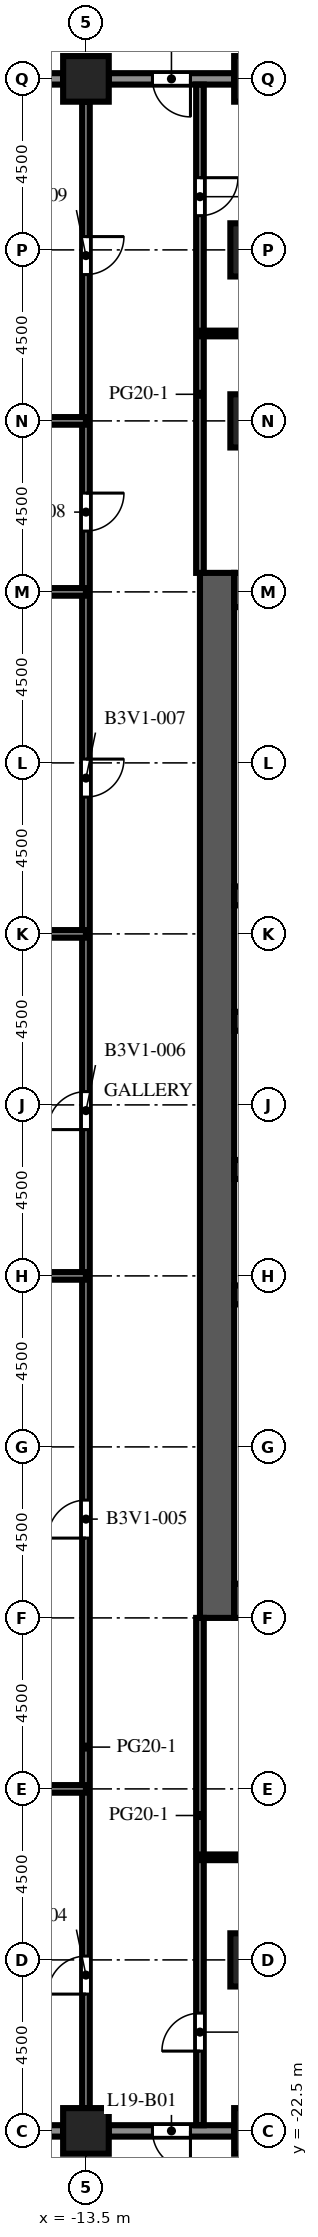
"""IFC4 building model, lengths in metres.
Left out: names, types, materials, properties, quantities, classifications, styles, units other than length and angle.
Written with IfcOpenShell. Run it as: python <this file> out.ifc"""

import sys

from ifc_helpers import new_model, si_unit, direction, frame, frame_2d, origin, origin_2d, place, context, subcontext, project, spatial, rectangle, extrude, element, fill, save


model = new_model("IFC4")
c1 = context("Model", 3, precision=1e-05, world=origin(), true_north=direction((0.0, 1.0)))
c2 = subcontext(c1, "Body", "Model", "MODEL_VIEW")
j1 = project(units=[si_unit("LENGTHUNIT", "METRE"), si_unit("PLANEANGLEUNIT", "RADIAN")], contexts=[c1])
p1 = place(None, origin())
s1 = spatial("IfcSite", under=j1, at=p1, CompositionType="ELEMENT")
p2 = place(p1, origin())
s2 = spatial("IfcBuilding", under=s1, at=p2, CompositionType="ELEMENT")
p3 = place(p2, frame((0.0, 0.0, 86.1)))
s3 = spatial("IfcBuildingStorey", under=s2, at=p3, CompositionType="ELEMENT", Elevation=86.1)
for number, where, z_axis, x_axis in (
    (1, (-13.5, -22.5, 0.0), (0.0, 0.0, 1.0), (1.0, 0.0, 0.0)),
    (2, (-13.5, 31.5, 0.0), (0.0, 0.0, 1.0), (1.0, 0.0, 0.0)),
    (3, (-9.0, -22.5, 0.0), (0.0, 0.0, 1.0), (1.0, 0.0, 0.0)),
    (4, (-9.0, 31.5, 0.0), (0.0, 0.0, 1.0), (1.0, 0.0, 0.0)),
):
    element("IfcColumn", number, at=place(p3, frame(where, z_axis=z_axis, x_axis=x_axis)), inside=s3, PredefinedType="COLUMN", context=c2, shape_type="SweptSolid", body=[
        extrude(rectangle(XDim=1.2, YDim=1.2, at=origin_2d()), origin(), (0.0, 0.0, 1.0), 4.1),
    ])
for number, where, z_axis, x_axis in (
    (5, (-9.0, -18.0, 0.0), (0.0, 0.0, 1.0), (1.0, 0.0, 0.0)),
    (6, (-9.0, 22.5, 0.0), (0.0, 0.0, 1.0), (1.0, 0.0, 0.0)),
    (7, (-9.0, 27.0, 0.0), (0.0, 0.0, 1.0), (1.0, 0.0, 0.0)),
):
    element("IfcColumn", number, at=place(p3, frame(where, z_axis=z_axis, x_axis=x_axis)), inside=s3, PredefinedType="COLUMN", context=c2, shape_type="SweptSolid", body=[
        extrude(rectangle(XDim=1.4, YDim=1.4, at=origin_2d()), origin(), (0.0, 0.0, 1.0), 4.1),
    ])
p4 = place(p3, frame((-10.05, -9.0, 0.0), z_axis=(0.0, 0.0, 1.0), x_axis=(0.0, 1.0, 0.0)))
e8 = element("IfcWall", 8, at=p4, inside=s3, PredefinedType="SHEAR", context=c2, shape_type="SweptSolid", body=[
    extrude(rectangle(XDim=27.5, YDim=0.9, at=frame_2d((13.75, 0.0))), origin(), (0.0, 0.0, 1.0), 4.1),
])
p5 = place(p4, frame((12.55, 0.0, 0.0)))
e9 = element("IfcOpeningElement", 9, at=p5, cuts=e8, PredefinedType="OPENING", context=c2, shape_type="SweptSolid", body=[
    extrude(rectangle(XDim=2.4, YDim=2.4, at=frame_2d((1.2, 1.2))), frame((0.0, 0.46, 0.0), z_axis=(0.0, -1.0, 0.0), x_axis=(1.0, 0.0, 0.0)), (0.0, 0.0, 1.0), 0.92),
])
p6 = place(p4, frame((6.825, 0.0, 0.0)))
e10 = element("IfcOpeningElement", 10, at=p6, cuts=e8, PredefinedType="OPENING", context=c2, shape_type="SweptSolid", body=[
    extrude(rectangle(XDim=1.2, YDim=2.1, at=frame_2d((0.6, 1.05))), frame((0.0, 0.46, 0.0), z_axis=(0.0, -1.0, 0.0), x_axis=(1.0, 0.0, 0.0)), (0.0, 0.0, 1.0), 0.92),
])
p7 = place(p4, frame((19.475, 0.0, 0.0)))
e11 = element("IfcOpeningElement", 11, at=p7, cuts=e8, PredefinedType="OPENING", context=c2, shape_type="SweptSolid", body=[
    extrude(rectangle(XDim=1.2, YDim=2.1, at=frame_2d((0.6, 1.05))), frame((0.0, 0.46, 0.0), z_axis=(0.0, -1.0, 0.0), x_axis=(1.0, 0.0, 0.0)), (0.0, 0.0, 1.0), 0.92),
])
for number, where, z_axis, x_axis in (
    (12, (-9.6, -8.55, 0.0), (0.0, 0.0, 1.0), (1.0, 0.0, 0.0)),
    (13, (-9.6, 18.05, 0.0), (0.0, 0.0, 1.0), (1.0, 0.0, 0.0)),
):
    element("IfcWall", number, at=place(p3, frame(where, z_axis=z_axis, x_axis=x_axis)), inside=s3, PredefinedType="SHEAR", context=c2, shape_type="SweptSolid", body=[
        extrude(rectangle(XDim=10.2, YDim=0.9, at=frame_2d((5.1, 0.0))), origin(), (0.0, 0.0, 1.0), 4.1),
    ])
p8 = place(p3, frame((-9.6, -0.5, 0.0), z_axis=(0.0, 0.0, 1.0), x_axis=(1.0, 0.0, 0.0)))
e14 = element("IfcWall", 14, at=p8, inside=s3, PredefinedType="SHEAR", context=c2, shape_type="SweptSolid", body=[
    extrude(rectangle(XDim=10.2, YDim=0.5, at=frame_2d((5.1, 0.0))), origin(), (0.0, 0.0, 1.0), 4.1),
])
p9 = place(p3, frame((-9.6, 2.8, 0.0), z_axis=(0.0, 0.0, 1.0), x_axis=(1.0, 0.0, 0.0)))
e15 = element("IfcWall", 15, at=p9, inside=s3, PredefinedType="SHEAR", context=c2, shape_type="SweptSolid", body=[
    extrude(rectangle(XDim=10.2, YDim=0.5, at=frame_2d((5.1, 0.0))), origin(), (0.0, 0.0, 1.0), 4.1),
])
p10 = place(p9, frame((0.562, 0.0, 0.0)))
e16 = element("IfcOpeningElement", 16, at=p10, cuts=e15, PredefinedType="OPENING", context=c2, shape_type="SweptSolid", body=[
    extrude(rectangle(XDim=1.1, YDim=2.1, at=frame_2d((0.55, 1.05))), frame((0.0, 0.26, 0.0), z_axis=(0.0, -1.0, 0.0), x_axis=(1.0, 0.0, 0.0)), (0.0, 0.0, 1.0), 0.52),
])
p11 = place(p9, frame((3.238, 0.0, 0.0)))
e17 = element("IfcOpeningElement", 17, at=p11, cuts=e15, PredefinedType="OPENING", context=c2, shape_type="SweptSolid", body=[
    extrude(rectangle(XDim=1.1, YDim=2.1, at=frame_2d((0.55, 1.05))), frame((0.0, 0.26, 0.0), z_axis=(0.0, -1.0, 0.0), x_axis=(1.0, 0.0, 0.0)), (0.0, 0.0, 1.0), 0.52),
])
p12 = place(p9, frame((8.538, 0.0, 0.0)))
e18 = element("IfcOpeningElement", 18, at=p12, cuts=e15, PredefinedType="OPENING", context=c2, shape_type="SweptSolid", body=[
    extrude(rectangle(XDim=1.1, YDim=2.1, at=frame_2d((0.55, 1.05))), frame((0.0, 0.26, 0.0), z_axis=(0.0, -1.0, 0.0), x_axis=(1.0, 0.0, 0.0)), (0.0, 0.0, 1.0), 0.52),
])
p13 = place(p3, frame((-9.6, 6.7, 0.0), z_axis=(0.0, 0.0, 1.0), x_axis=(1.0, 0.0, 0.0)))
e19 = element("IfcWall", 19, at=p13, inside=s3, PredefinedType="SHEAR", context=c2, shape_type="SweptSolid", body=[
    extrude(rectangle(XDim=10.2, YDim=0.5, at=frame_2d((5.1, 0.0))), origin(), (0.0, 0.0, 1.0), 4.1),
])
p14 = place(p13, frame((0.562, 0.0, 0.0)))
e20 = element("IfcOpeningElement", 20, at=p14, cuts=e19, PredefinedType="OPENING", context=c2, shape_type="SweptSolid", body=[
    extrude(rectangle(XDim=1.1, YDim=2.1, at=frame_2d((0.55, 1.05))), frame((0.0, 0.26, 0.0), z_axis=(0.0, -1.0, 0.0), x_axis=(1.0, 0.0, 0.0)), (0.0, 0.0, 1.0), 0.52),
])
p15 = place(p13, frame((3.288, 0.0, 0.0)))
e21 = element("IfcOpeningElement", 21, at=p15, cuts=e19, PredefinedType="OPENING", context=c2, shape_type="SweptSolid", body=[
    extrude(rectangle(XDim=1.0, YDim=2.1, at=frame_2d((0.5, 1.05))), frame((0.0, 0.26, 0.0), z_axis=(0.0, -1.0, 0.0), x_axis=(1.0, 0.0, 0.0)), (0.0, 0.0, 1.0), 0.52),
])
p16 = place(p13, frame((5.913, 0.0, 0.0)))
e22 = element("IfcOpeningElement", 22, at=p16, cuts=e19, PredefinedType="OPENING", context=c2, shape_type="SweptSolid", body=[
    extrude(rectangle(XDim=1.0, YDim=2.1, at=frame_2d((0.5, 1.05))), frame((0.0, 0.26, 0.0), z_axis=(0.0, -1.0, 0.0), x_axis=(1.0, 0.0, 0.0)), (0.0, 0.0, 1.0), 0.52),
])
p17 = place(p13, frame((8.587, 0.0, 0.0)))
e23 = element("IfcOpeningElement", 23, at=p17, cuts=e19, PredefinedType="OPENING", context=c2, shape_type="SweptSolid", body=[
    extrude(rectangle(XDim=1.0, YDim=2.1, at=frame_2d((0.5, 1.05))), frame((0.0, 0.26, 0.0), z_axis=(0.0, -1.0, 0.0), x_axis=(1.0, 0.0, 0.0)), (0.0, 0.0, 1.0), 0.52),
])
p18 = place(p3, frame((-9.6, 10.0, 0.0), z_axis=(0.0, 0.0, 1.0), x_axis=(1.0, 0.0, 0.0)))
e24 = element("IfcWall", 24, at=p18, inside=s3, PredefinedType="SHEAR", context=c2, shape_type="SweptSolid", body=[
    extrude(rectangle(XDim=10.2, YDim=0.5, at=frame_2d((5.1, 0.0))), origin(), (0.0, 0.0, 1.0), 4.1),
])
p19 = place(p3, frame((-14.1, -22.5, 0.0), z_axis=(0.0, 0.0, 1.0), x_axis=(-1.0, 0.0, 0.0)))
e25 = element("IfcWall", 25, at=p19, inside=s3, PredefinedType="SOLIDWALL", context=c2, shape_type="SweptSolid", body=[
    extrude(rectangle(XDim=3.3, YDim=0.3, at=frame_2d((1.65, 0.0))), origin(), (0.0, 0.0, 1.0), 2.75),
])
p20 = place(p19, frame((0.45, 0.0, 0.8)))
e26 = element("IfcOpeningElement", 26, at=p20, cuts=e25, PredefinedType="OPENING", context=c2, shape_type="SweptSolid", body=[
    extrude(rectangle(XDim=2.4, YDim=1.7, at=frame_2d((1.2, 0.85))), frame((0.0, 0.16, 0.0), z_axis=(0.0, -1.0, 0.0), x_axis=(1.0, 0.0, 0.0)), (0.0, 0.0, 1.0), 0.32),
])
p21 = place(p3, frame((-9.6, -22.5, 0.0), z_axis=(0.0, 0.0, 1.0), x_axis=(-1.0, 0.0, 0.0)))
e27 = element("IfcWall", 27, at=p21, inside=s3, PredefinedType="SOLIDWALL", context=c2, shape_type="SweptSolid", body=[
    extrude(rectangle(XDim=3.3, YDim=0.3, at=frame_2d((1.65, 0.0))), origin(), (0.0, 0.0, 1.0), 2.75),
])
p22 = place(p21, frame((1.15, 0.0, 0.0)))
e28 = element("IfcOpeningElement", 28, at=p22, cuts=e27, PredefinedType="OPENING", context=c2, shape_type="SweptSolid", body=[
    extrude(rectangle(XDim=1.0, YDim=2.2, at=frame_2d((0.5, 1.1))), frame((0.0, 0.16, 0.0), z_axis=(0.0, -1.0, 0.0), x_axis=(1.0, 0.0, 0.0)), (0.0, 0.0, 1.0), 0.32),
])
p23 = place(p3, frame((-12.9, 31.5, 0.0), z_axis=(0.0, 0.0, 1.0), x_axis=(1.0, 0.0, 0.0)))
e29 = element("IfcWall", 29, at=p23, inside=s3, PredefinedType="SOLIDWALL", context=c2, shape_type="SweptSolid", body=[
    extrude(rectangle(XDim=3.3, YDim=0.3, at=frame_2d((1.65, 0.0))), origin(), (0.0, 0.0, 1.0), 2.75),
])
p24 = place(p23, frame((1.15, 0.0, 0.0)))
e30 = element("IfcOpeningElement", 30, at=p24, cuts=e29, PredefinedType="OPENING", context=c2, shape_type="SweptSolid", body=[
    extrude(rectangle(XDim=1.0, YDim=2.2, at=frame_2d((0.5, 1.1))), frame((0.0, 0.16, 0.0), z_axis=(0.0, -1.0, 0.0), x_axis=(1.0, 0.0, 0.0)), (0.0, 0.0, 1.0), 0.32),
])
p25 = place(p3, frame((-17.4, 31.5, 0.0), z_axis=(0.0, 0.0, 1.0), x_axis=(1.0, 0.0, 0.0)))
e31 = element("IfcWall", 31, at=p25, inside=s3, PredefinedType="SOLIDWALL", context=c2, shape_type="SweptSolid", body=[
    extrude(rectangle(XDim=3.3, YDim=0.3, at=frame_2d((1.65, 0.0))), origin(), (0.0, 0.0, 1.0), 2.75),
])
p26 = place(p25, frame((0.45, 0.0, 0.8)))
e32 = element("IfcOpeningElement", 32, at=p26, cuts=e31, PredefinedType="OPENING", context=c2, shape_type="SweptSolid", body=[
    extrude(rectangle(XDim=2.4, YDim=1.7, at=frame_2d((1.2, 0.85))), frame((0.0, 0.16, 0.0), z_axis=(0.0, -1.0, 0.0), x_axis=(1.0, 0.0, 0.0)), (0.0, 0.0, 1.0), 0.32),
])
p27 = place(p3, frame((-13.5, -21.9, 0.0), z_axis=(0.0, 0.0, 1.0), x_axis=(0.0, 1.0, 0.0)))
e33 = element("IfcWall", 33, at=p27, inside=s3, PredefinedType="PARTITIONING", context=c2, shape_type="SweptSolid", body=[
    extrude(rectangle(XDim=52.8, YDim=0.2, at=frame_2d((26.4, 0.0))), origin(), (0.0, 0.0, 1.0), 3.65),
])
p28 = place(p27, frame((3.0, 0.0, 0.0)))
e34 = element("IfcOpeningElement", 34, at=p28, cuts=e33, PredefinedType="OPENING", context=c2, shape_type="SweptSolid", body=[
    extrude(rectangle(XDim=1.0, YDim=2.1, at=frame_2d((0.5, 1.05))), frame((0.0, 0.11, 0.0), z_axis=(0.0, -1.0, 0.0), x_axis=(1.0, 0.0, 0.0)), (0.0, 0.0, 1.0), 0.22),
])
p29 = place(p27, frame((15.0, 0.0, 0.0)))
e35 = element("IfcOpeningElement", 35, at=p29, cuts=e33, PredefinedType="OPENING", context=c2, shape_type="SweptSolid", body=[
    extrude(rectangle(XDim=1.0, YDim=2.1, at=frame_2d((0.5, 1.05))), frame((0.0, 0.11, 0.0), z_axis=(0.0, -1.0, 0.0), x_axis=(1.0, 0.0, 0.0)), (0.0, 0.0, 1.0), 0.22),
])
p30 = place(p27, frame((25.75, 0.0, 0.0)))
e36 = element("IfcOpeningElement", 36, at=p30, cuts=e33, PredefinedType="OPENING", context=c2, shape_type="SweptSolid", body=[
    extrude(rectangle(XDim=1.0, YDim=2.1, at=frame_2d((0.5, 1.05))), frame((0.0, 0.11, 0.0), z_axis=(0.0, -1.0, 0.0), x_axis=(1.0, 0.0, 0.0)), (0.0, 0.0, 1.0), 0.22),
])
p31 = place(p27, frame((34.5, 0.0, 0.0)))
e37 = element("IfcOpeningElement", 37, at=p31, cuts=e33, PredefinedType="OPENING", context=c2, shape_type="SweptSolid", body=[
    extrude(rectangle(XDim=1.0, YDim=2.1, at=frame_2d((0.5, 1.05))), frame((0.0, 0.11, 0.0), z_axis=(0.0, -1.0, 0.0), x_axis=(1.0, 0.0, 0.0)), (0.0, 0.0, 1.0), 0.22),
])
p32 = place(p27, frame((41.5, 0.0, 0.0)))
e38 = element("IfcOpeningElement", 38, at=p32, cuts=e33, PredefinedType="OPENING", context=c2, shape_type="SweptSolid", body=[
    extrude(rectangle(XDim=1.0, YDim=2.1, at=frame_2d((0.5, 1.05))), frame((0.0, 0.11, 0.0), z_axis=(0.0, -1.0, 0.0), x_axis=(1.0, 0.0, 0.0)), (0.0, 0.0, 1.0), 0.22),
])
p33 = place(p27, frame((48.25, 0.0, 0.0)))
e39 = element("IfcOpeningElement", 39, at=p33, cuts=e33, PredefinedType="OPENING", context=c2, shape_type="SweptSolid", body=[
    extrude(rectangle(XDim=1.0, YDim=2.1, at=frame_2d((0.5, 1.05))), frame((0.0, 0.11, 0.0), z_axis=(0.0, -1.0, 0.0), x_axis=(1.0, 0.0, 0.0)), (0.0, 0.0, 1.0), 0.22),
])
p34 = place(p3, frame((-10.5, -9.0, 0.0), z_axis=(0.0, 0.0, 1.0), x_axis=(0.0, -1.0, 0.0)))
e40 = element("IfcWall", 40, at=p34, inside=s3, PredefinedType="PARTITIONING", context=c2, shape_type="SweptSolid", body=[
    extrude(rectangle(XDim=13.35, YDim=0.2, at=frame_2d((6.675, 0.0))), origin(), (0.0, 0.0, 1.0), 3.65),
])
p35 = place(p34, frame((10.4, 0.0, 0.0)))
e41 = element("IfcOpeningElement", 41, at=p35, cuts=e40, PredefinedType="OPENING", context=c2, shape_type="SweptSolid", body=[
    extrude(rectangle(XDim=1.0, YDim=2.1, at=frame_2d((0.5, 1.05))), frame((0.0, 0.11, 0.0), z_axis=(0.0, -1.0, 0.0), x_axis=(1.0, 0.0, 0.0)), (0.0, 0.0, 1.0), 0.22),
])
p36 = place(p3, frame((-10.5, 31.35, 0.0), z_axis=(0.0, 0.0, 1.0), x_axis=(0.0, -1.0, 0.0)))
e42 = element("IfcWall", 42, at=p36, inside=s3, PredefinedType="PARTITIONING", context=c2, shape_type="SweptSolid", body=[
    extrude(rectangle(XDim=12.85, YDim=0.2, at=frame_2d((6.425, 0.0))), origin(), (0.0, 0.0, 1.0), 3.65),
])
p37 = place(p36, frame((2.45, 0.0, 0.0)))
e43 = element("IfcOpeningElement", 43, at=p37, cuts=e42, PredefinedType="OPENING", context=c2, shape_type="SweptSolid", body=[
    extrude(rectangle(XDim=1.0, YDim=2.1, at=frame_2d((0.5, 1.05))), frame((0.0, 0.11, 0.0), z_axis=(0.0, -1.0, 0.0), x_axis=(1.0, 0.0, 0.0)), (0.0, 0.0, 1.0), 0.22),
])
p38 = place(p3, frame((-10.5, -15.3, 0.0), z_axis=(0.0, 0.0, 1.0), x_axis=(1.0, 0.0, 0.0)))
e44 = element("IfcWall", 44, at=p38, inside=s3, PredefinedType="PARTITIONING", context=c2, shape_type="SweptSolid", body=[
    extrude(rectangle(XDim=28.5, YDim=0.15, at=frame_2d((14.25, 0.0))), origin(), (0.0, 0.0, 1.0), 3.65),
])
p39 = place(p38, frame((5.35, 0.0, 0.0)))
e45 = element("IfcOpeningElement", 45, at=p39, cuts=e44, PredefinedType="OPENING", context=c2, shape_type="SweptSolid", body=[
    extrude(rectangle(XDim=1.0, YDim=2.1, at=frame_2d((0.5, 1.05))), frame((0.0, 0.085, 0.0), z_axis=(0.0, -1.0, 0.0), x_axis=(1.0, 0.0, 0.0)), (0.0, 0.0, 1.0), 0.17),
])
p40 = place(p38, frame((18.1, 0.0, 0.0)))
e46 = element("IfcOpeningElement", 46, at=p40, cuts=e44, PredefinedType="OPENING", context=c2, shape_type="SweptSolid", body=[
    extrude(rectangle(XDim=1.0, YDim=2.1, at=frame_2d((0.5, 1.05))), frame((0.0, 0.085, 0.0), z_axis=(0.0, -1.0, 0.0), x_axis=(1.0, 0.0, 0.0)), (0.0, 0.0, 1.0), 0.17),
])
p41 = place(p38, frame((26.1, 0.0, 0.0)))
e47 = element("IfcOpeningElement", 47, at=p41, cuts=e44, PredefinedType="OPENING", context=c2, shape_type="SweptSolid", body=[
    extrude(rectangle(XDim=1.0, YDim=2.1, at=frame_2d((0.5, 1.05))), frame((0.0, 0.085, 0.0), z_axis=(0.0, -1.0, 0.0), x_axis=(1.0, 0.0, 0.0)), (0.0, 0.0, 1.0), 0.17),
])
p42 = place(p3, frame((-21.9, -13.5, 0.0), z_axis=(0.0, 0.0, 1.0), x_axis=(1.0, 0.0, 0.0)))
e48 = element("IfcWall", 48, at=p42, inside=s3, PredefinedType="PARTITIONING", context=c2, shape_type="SweptSolid", body=[
    extrude(rectangle(XDim=8.4, YDim=0.2, at=frame_2d((4.2, 0.0))), origin(), (0.0, 0.0, 1.0), 3.65),
])
for number, where, z_axis, x_axis in (
    (49, (-17.3, 0.0, 0.0), (0.0, 0.0, 1.0), (1.0, 0.0, 0.0)),
    (50, (-17.3, 9.0, 0.0), (0.0, 0.0, 1.0), (1.0, 0.0, 0.0)),
    (51, (-17.3, 18.0, 0.0), (0.0, 0.0, 1.0), (1.0, 0.0, 0.0)),
    (52, (-17.3, 22.5, 0.0), (0.0, 0.0, 1.0), (1.0, 0.0, 0.0)),
):
    element("IfcWall", number, at=place(p3, frame(where, z_axis=z_axis, x_axis=x_axis)), inside=s3, PredefinedType="PARTITIONING", context=c2, shape_type="SweptSolid", body=[
        extrude(rectangle(XDim=3.8, YDim=0.2, at=frame_2d((1.9, 0.0))), origin(), (0.0, 0.0, 1.0), 3.65),
    ])
p43 = place(p3, frame((18.0, 24.8, 0.0), z_axis=(0.0, 0.0, 1.0), x_axis=(-1.0, 0.0, 0.0)))
e53 = element("IfcWall", 53, at=p43, inside=s3, PredefinedType="PARTITIONING", context=c2, shape_type="SweptSolid", body=[
    extrude(rectangle(XDim=28.5, YDim=0.15, at=frame_2d((14.25, 0.0))), origin(), (0.0, 0.0, 1.0), 3.65),
])
p44 = place(p43, frame((23.65, 0.0, 0.0)))
e54 = element("IfcOpeningElement", 54, at=p44, cuts=e53, PredefinedType="OPENING", context=c2, shape_type="SweptSolid", body=[
    extrude(rectangle(XDim=1.0, YDim=2.1, at=frame_2d((0.5, 1.05))), frame((0.0, 0.085, 0.0), z_axis=(0.0, -1.0, 0.0), x_axis=(1.0, 0.0, 0.0)), (0.0, 0.0, 1.0), 0.17),
])
p45 = place(p43, frame((12.65, 0.0, 0.0)))
e55 = element("IfcOpeningElement", 55, at=p45, cuts=e53, PredefinedType="OPENING", context=c2, shape_type="SweptSolid", body=[
    extrude(rectangle(XDim=1.0, YDim=2.1, at=frame_2d((0.5, 1.05))), frame((0.0, 0.085, 0.0), z_axis=(0.0, -1.0, 0.0), x_axis=(1.0, 0.0, 0.0)), (0.0, 0.0, 1.0), 0.17),
])
p46 = place(p43, frame((1.9, 0.0, 0.0)))
e56 = element("IfcOpeningElement", 56, at=p46, cuts=e53, PredefinedType="OPENING", context=c2, shape_type="SweptSolid", body=[
    extrude(rectangle(XDim=1.0, YDim=2.1, at=frame_2d((0.5, 1.05))), frame((0.0, 0.085, 0.0), z_axis=(0.0, -1.0, 0.0), x_axis=(1.0, 0.0, 0.0)), (0.0, 0.0, 1.0), 0.17),
])
p47 = place(p22, origin())
e57 = element("IfcDoor", 57, at=p47, inside=s3, OperationType="SINGLE_SWING_LEFT", PredefinedType="DOOR", context=c2, shape_type="SweptSolid", body=[
    extrude(rectangle(XDim=1.0, YDim=2.2, at=frame_2d((0.5, 1.1))), frame((0.0, 0.025, 0.0), z_axis=(0.0, -1.0, 0.0), x_axis=(1.0, 0.0, 0.0)), (0.0, 0.0, 1.0), 0.05),
])
fill(e28, e57)
p48 = place(p24, origin())
e58 = element("IfcDoor", 58, at=p48, inside=s3, OperationType="SINGLE_SWING_RIGHT", PredefinedType="DOOR", context=c2, shape_type="SweptSolid", body=[
    extrude(rectangle(XDim=1.0, YDim=2.2, at=frame_2d((0.5, 1.1))), frame((0.0, 0.025, 0.0), z_axis=(0.0, -1.0, 0.0), x_axis=(1.0, 0.0, 0.0)), (0.0, 0.0, 1.0), 0.05),
])
fill(e30, e58)
p49 = place(p5, origin())
e59 = element("IfcDoor", 59, at=p49, inside=s3, OperationType="DOUBLE_DOOR_DOUBLE_SWING", PredefinedType="DOOR", context=c2, shape_type="SweptSolid", body=[
    extrude(rectangle(XDim=2.4, YDim=2.4, at=frame_2d((1.2, 1.2))), frame((0.0, 0.025, 0.0), z_axis=(0.0, -1.0, 0.0), x_axis=(1.0, 0.0, 0.0)), (0.0, 0.0, 1.0), 0.05),
])
fill(e9, e59)
p50 = place(p6, origin())
e60 = element("IfcDoor", 60, at=p50, inside=s3, OperationType="SINGLE_SWING_LEFT", PredefinedType="DOOR", context=c2, shape_type="SweptSolid", body=[
    extrude(rectangle(XDim=1.2, YDim=2.1, at=frame_2d((0.6, 1.05))), frame((0.0, 0.025, 0.0), z_axis=(0.0, -1.0, 0.0), x_axis=(1.0, 0.0, 0.0)), (0.0, 0.0, 1.0), 0.05),
])
fill(e10, e60)
p51 = place(p7, origin())
e61 = element("IfcDoor", 61, at=p51, inside=s3, OperationType="SINGLE_SWING_LEFT", PredefinedType="DOOR", context=c2, shape_type="SweptSolid", body=[
    extrude(rectangle(XDim=1.2, YDim=2.1, at=frame_2d((0.6, 1.05))), frame((0.0, 0.025, 0.0), z_axis=(0.0, -1.0, 0.0), x_axis=(1.0, 0.0, 0.0)), (0.0, 0.0, 1.0), 0.05),
])
fill(e11, e61)
p52 = place(p28, origin())
e62 = element("IfcDoor", 62, at=p52, inside=s3, OperationType="SINGLE_SWING_LEFT", PredefinedType="DOOR", context=c2, shape_type="SweptSolid", body=[
    extrude(rectangle(XDim=1.0, YDim=2.1, at=frame_2d((0.5, 1.05))), frame((0.0, 0.025, 0.0), z_axis=(0.0, -1.0, 0.0), x_axis=(1.0, 0.0, 0.0)), (0.0, 0.0, 1.0), 0.05),
])
fill(e34, e62)
p53 = place(p29, origin())
e63 = element("IfcDoor", 63, at=p53, inside=s3, OperationType="SINGLE_SWING_LEFT", PredefinedType="DOOR", context=c2, shape_type="SweptSolid", body=[
    extrude(rectangle(XDim=1.0, YDim=2.1, at=frame_2d((0.5, 1.05))), frame((0.0, 0.025, 0.0), z_axis=(0.0, -1.0, 0.0), x_axis=(1.0, 0.0, 0.0)), (0.0, 0.0, 1.0), 0.05),
])
fill(e35, e63)
p54 = place(p30, origin())
e64 = element("IfcDoor", 64, at=p54, inside=s3, OperationType="SINGLE_SWING_LEFT", PredefinedType="DOOR", context=c2, shape_type="SweptSolid", body=[
    extrude(rectangle(XDim=1.0, YDim=2.1, at=frame_2d((0.5, 1.05))), frame((0.0, 0.025, 0.0), z_axis=(0.0, -1.0, 0.0), x_axis=(1.0, 0.0, 0.0)), (0.0, 0.0, 1.0), 0.05),
])
fill(e36, e64)
p55 = place(p31, origin())
e65 = element("IfcDoor", 65, at=p55, inside=s3, OperationType="SINGLE_SWING_RIGHT", PredefinedType="DOOR", context=c2, shape_type="SweptSolid", body=[
    extrude(rectangle(XDim=1.0, YDim=2.1, at=frame_2d((0.5, 1.05))), frame((0.0, 0.025, 0.0), z_axis=(0.0, -1.0, 0.0), x_axis=(1.0, 0.0, 0.0)), (0.0, 0.0, 1.0), 0.05),
])
fill(e37, e65)
p56 = place(p32, origin())
e66 = element("IfcDoor", 66, at=p56, inside=s3, OperationType="SINGLE_SWING_RIGHT", PredefinedType="DOOR", context=c2, shape_type="SweptSolid", body=[
    extrude(rectangle(XDim=1.0, YDim=2.1, at=frame_2d((0.5, 1.05))), frame((0.0, 0.025, 0.0), z_axis=(0.0, -1.0, 0.0), x_axis=(1.0, 0.0, 0.0)), (0.0, 0.0, 1.0), 0.05),
])
fill(e38, e66)
p57 = place(p33, origin())
e67 = element("IfcDoor", 67, at=p57, inside=s3, OperationType="SINGLE_SWING_RIGHT", PredefinedType="DOOR", context=c2, shape_type="SweptSolid", body=[
    extrude(rectangle(XDim=1.0, YDim=2.1, at=frame_2d((0.5, 1.05))), frame((0.0, 0.025, 0.0), z_axis=(0.0, -1.0, 0.0), x_axis=(1.0, 0.0, 0.0)), (0.0, 0.0, 1.0), 0.05),
])
fill(e39, e67)
p58 = place(p35, origin())
e68 = element("IfcDoor", 68, at=p58, inside=s3, OperationType="SINGLE_SWING_RIGHT", PredefinedType="DOOR", context=c2, shape_type="SweptSolid", body=[
    extrude(rectangle(XDim=1.0, YDim=2.1, at=frame_2d((0.5, 1.05))), frame((0.0, 0.025, 0.0), z_axis=(0.0, -1.0, 0.0), x_axis=(1.0, 0.0, 0.0)), (0.0, 0.0, 1.0), 0.05),
])
fill(e41, e68)
p59 = place(p37, origin())
e69 = element("IfcDoor", 69, at=p59, inside=s3, OperationType="SINGLE_SWING_LEFT", PredefinedType="DOOR", context=c2, shape_type="SweptSolid", body=[
    extrude(rectangle(XDim=1.0, YDim=2.1, at=frame_2d((0.5, 1.05))), frame((0.0, 0.025, 0.0), z_axis=(0.0, -1.0, 0.0), x_axis=(1.0, 0.0, 0.0)), (0.0, 0.0, 1.0), 0.05),
])
fill(e43, e69)
save(model, sys.argv[1])
